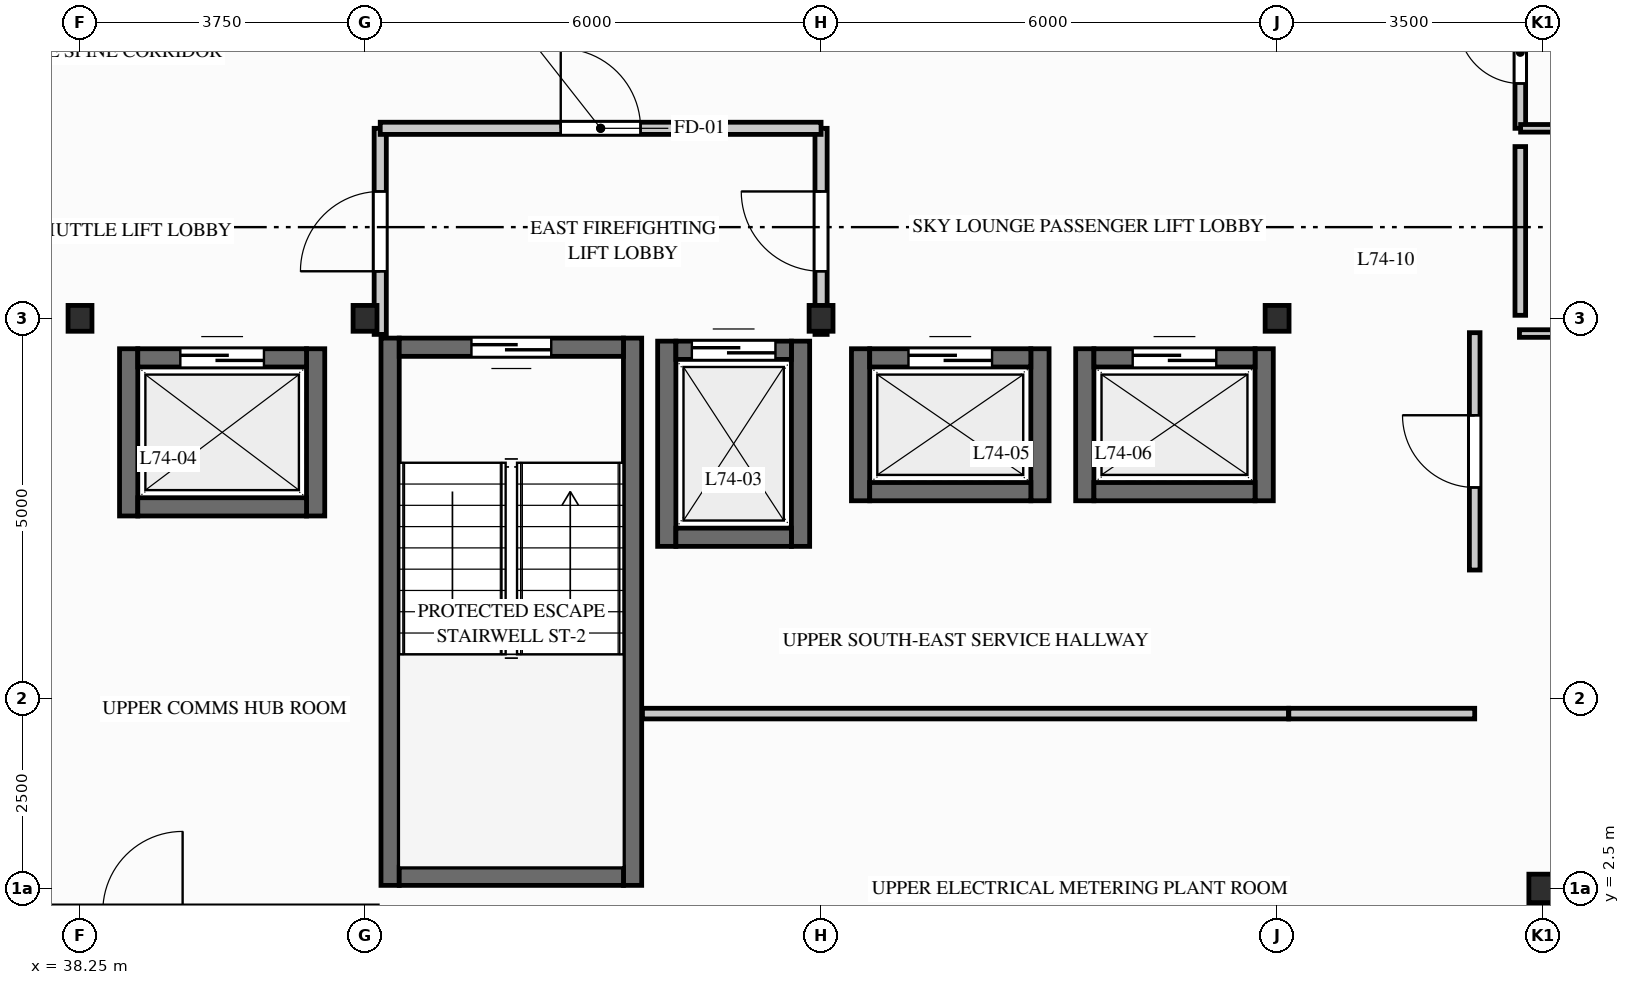
"""IFC4 building model, lengths in metres.
Left out: names, types, materials, properties, quantities, classifications, styles, units other than length and angle.
Written with IfcOpenShell. Run it as: python <this file> out.ifc"""

import sys

from ifc_helpers import new_model, si_unit, direction, frame, frame_2d, origin, origin_2d, place, context, subcontext, project, spatial, rectangle, i_section, extrude, element, fill, save


model = new_model("IFC4")
c1 = context("Model", 3, precision=1e-05, world=origin(), true_north=direction((0.0, 1.0)))
c2 = subcontext(c1, "Body", "Model", "MODEL_VIEW")
j1 = project(units=[si_unit("LENGTHUNIT", "METRE"), si_unit("PLANEANGLEUNIT", "RADIAN")], contexts=[c1])
p1 = place(None, origin())
s1 = spatial("IfcSite", under=j1, at=p1, CompositionType="ELEMENT")
p2 = place(p1, origin())
s2 = spatial("IfcBuilding", under=s1, at=p2, CompositionType="ELEMENT")
p3 = place(p2, frame((0.0, 0.0, 243.65)))
s3 = spatial("IfcBuildingStorey", under=s2, at=p3, CompositionType="ELEMENT", Elevation=243.65)
for number, where, z_axis, x_axis in (
    (1, (38.25, 10.0, 0.0), (0.0, 0.0, 1.0), (1.0, 0.0, 0.0)),
    (2, (42.0, 10.0, 0.0), (0.0, 0.0, 1.0), (1.0, 0.0, 0.0)),
    (3, (48.0, 10.0, 0.0), (0.0, 0.0, 1.0), (1.0, 0.0, 0.0)),
    (4, (54.0, 10.0, 0.0), (0.0, 0.0, 1.0), (1.0, 0.0, 0.0)),
):
    element("IfcColumn", number, at=place(p3, frame(where, z_axis=z_axis, x_axis=x_axis)), inside=s3, PredefinedType="COLUMN", context=c2, shape_type="SweptSolid", body=[
        extrude(i_section(OverallWidth=0.314, OverallDepth=0.34, WebThickness=0.019, FlangeThickness=0.031, FilletRadius=0.015, at=origin_2d()), origin(), (0.0, 0.0, 1.0), 3.6),
    ])
p4 = place(p3, frame((57.5, 2.5, 0.0), z_axis=(0.0, 0.0, 1.0), x_axis=(1.0, 0.0, 0.0)))
e5 = element("IfcColumn", 5, at=p4, inside=s3, PredefinedType="COLUMN", context=c2, shape_type="SweptSolid", body=[
    extrude(i_section(OverallWidth=0.375, OverallDepth=0.375, WebThickness=0.017, FlangeThickness=0.027, FilletRadius=0.015, at=origin_2d()), origin(), (0.0, 0.0, 1.0), 3.6),
])
for number, where, z_axis, x_axis in (
    (6, (57.5, 0.15, 0.0), (0.0, 0.0, 1.0), (0.0, 1.0, 0.0)),
    (7, (57.5, 2.5, 0.0), (0.0, 0.0, 1.0), (1.0, 0.0, 0.0)),
):
    element("IfcWall", number, at=place(p3, frame(where, z_axis=z_axis, x_axis=x_axis)), inside=s3, PredefinedType="STANDARD", context=c2, shape_type="SweptSolid", body=[
        extrude(rectangle(XDim=2.35, YDim=0.3, at=frame_2d((1.175, 0.0))), origin(), (0.0, 0.0, 1.0), 3.34),
    ])
for number, where, z_axis, x_axis in (
    (8, (42.33, 2.54, 0.0), (0.0, 0.0, 1.0), (0.0, 1.0, 0.0)),
    (9, (45.52, 2.54, 0.0), (0.0, 0.0, 1.0), (0.0, 1.0, 0.0)),
):
    element("IfcWall", number, at=place(p3, frame(where, z_axis=z_axis, x_axis=x_axis)), inside=s3, PredefinedType="SHEAR", context=c2, shape_type="SweptSolid", body=[
        extrude(rectangle(XDim=7.2, YDim=0.24, at=frame_2d((3.6, 0.0))), origin(), (0.0, 0.0, 1.0), 3.34),
    ])
p5 = place(p3, frame((42.45, 2.66, 0.0), z_axis=(0.0, 0.0, 1.0), x_axis=(1.0, 0.0, 0.0)))
e10 = element("IfcWall", 10, at=p5, inside=s3, PredefinedType="SHEAR", context=c2, shape_type="SweptSolid", body=[
    extrude(rectangle(XDim=2.95, YDim=0.24, at=frame_2d((1.475, 0.0))), origin(), (0.0, 0.0, 1.0), 3.34),
])
p6 = place(p3, frame((45.4, 9.62, 0.0), z_axis=(0.0, 0.0, 1.0), x_axis=(-1.0, 0.0, 0.0)))
e11 = element("IfcWall", 11, at=p6, inside=s3, PredefinedType="SHEAR", context=c2, shape_type="SweptSolid", body=[
    extrude(rectangle(XDim=2.95, YDim=0.24, at=frame_2d((1.475, 0.0))), origin(), (0.0, 0.0, 1.0), 3.34),
])
p7 = place(p6, frame((0.95, 0.0, 0.0)))
e12 = element("IfcOpeningElement", 12, at=p7, cuts=e11, PredefinedType="OPENING", context=c2, shape_type="SweptSolid", body=[
    extrude(rectangle(XDim=1.05, YDim=2.06, at=frame_2d((0.525, 1.03))), frame((0.0, 0.13, 0.0), z_axis=(0.0, -1.0, 0.0), x_axis=(1.0, 0.0, 0.0)), (0.0, 0.0, 1.0), 0.26),
])
for number, where, z_axis, x_axis in (
    (13, (45.97, 7.0, 0.0), (0.0, 0.0, 1.0), (0.0, 1.0, 0.0)),
    (14, (47.73, 7.0, 0.0), (0.0, 0.0, 1.0), (0.0, 1.0, 0.0)),
):
    element("IfcWall", number, at=place(p3, frame(where, z_axis=z_axis, x_axis=x_axis)), inside=s3, PredefinedType="SHEAR", context=c2, shape_type="SweptSolid", body=[
        extrude(rectangle(XDim=2.7, YDim=0.24, at=frame_2d((1.35, 0.0))), origin(), (0.0, 0.0, 1.0), 3.34),
    ])
p8 = place(p3, frame((46.09, 7.12, 0.0), z_axis=(0.0, 0.0, 1.0), x_axis=(1.0, 0.0, 0.0)))
e15 = element("IfcWall", 15, at=p8, inside=s3, PredefinedType="SHEAR", context=c2, shape_type="SweptSolid", body=[
    extrude(rectangle(XDim=1.52, YDim=0.24, at=frame_2d((0.76, 0.0))), origin(), (0.0, 0.0, 1.0), 3.34),
])
p9 = place(p3, frame((46.09, 9.58, 0.0), z_axis=(0.0, 0.0, 1.0), x_axis=(1.0, 0.0, 0.0)))
e16 = element("IfcWall", 16, at=p9, inside=s3, PredefinedType="SHEAR", context=c2, shape_type="SweptSolid", body=[
    extrude(rectangle(XDim=1.52, YDim=0.24, at=frame_2d((0.76, 0.0))), origin(), (0.0, 0.0, 1.0), 3.34),
])
p10 = place(p9, frame((0.21, 0.0, 0.0)))
e17 = element("IfcOpeningElement", 17, at=p10, cuts=e16, PredefinedType="OPENING", context=c2, shape_type="SweptSolid", body=[
    extrude(rectangle(XDim=1.1, YDim=2.06, at=frame_2d((0.55, 1.03))), frame((0.0, 0.13, 0.0), z_axis=(0.0, -1.0, 0.0), x_axis=(1.0, 0.0, 0.0)), (0.0, 0.0, 1.0), 0.26),
])
for number, where, z_axis, x_axis in (
    (18, (38.89, 7.4, 0.0), (0.0, 0.0, 1.0), (0.0, 1.0, 0.0)),
    (19, (41.35, 7.4, 0.0), (0.0, 0.0, 1.0), (0.0, 1.0, 0.0)),
):
    element("IfcWall", number, at=place(p3, frame(where, z_axis=z_axis, x_axis=x_axis)), inside=s3, PredefinedType="SHEAR", context=c2, shape_type="SweptSolid", body=[
        extrude(rectangle(XDim=2.2, YDim=0.24, at=frame_2d((1.1, 0.0))), origin(), (0.0, 0.0, 1.0), 3.34),
    ])
p11 = place(p3, frame((39.01, 7.52, 0.0), z_axis=(0.0, 0.0, 1.0), x_axis=(1.0, 0.0, 0.0)))
e20 = element("IfcWall", 20, at=p11, inside=s3, PredefinedType="SHEAR", context=c2, shape_type="SweptSolid", body=[
    extrude(rectangle(XDim=2.22, YDim=0.24, at=frame_2d((1.11, 0.0))), origin(), (0.0, 0.0, 1.0), 3.34),
])
p12 = place(p3, frame((39.01, 9.48, 0.0), z_axis=(0.0, 0.0, 1.0), x_axis=(1.0, 0.0, 0.0)))
e21 = element("IfcWall", 21, at=p12, inside=s3, PredefinedType="SHEAR", context=c2, shape_type="SweptSolid", body=[
    extrude(rectangle(XDim=2.22, YDim=0.24, at=frame_2d((1.11, 0.0))), origin(), (0.0, 0.0, 1.0), 3.34),
])
p13 = place(p12, frame((0.56, 0.0, 0.0)))
e22 = element("IfcOpeningElement", 22, at=p13, cuts=e21, PredefinedType="OPENING", context=c2, shape_type="SweptSolid", body=[
    extrude(rectangle(XDim=1.1, YDim=2.06, at=frame_2d((0.55, 1.03))), frame((0.0, 0.13, 0.0), z_axis=(0.0, -1.0, 0.0), x_axis=(1.0, 0.0, 0.0)), (0.0, 0.0, 1.0), 0.26),
])
for number, where, z_axis, x_axis in (
    (23, (48.52, 7.6, 0.0), (0.0, 0.0, 1.0), (0.0, 1.0, 0.0)),
    (24, (50.88, 7.6, 0.0), (0.0, 0.0, 1.0), (0.0, 1.0, 0.0)),
):
    element("IfcWall", number, at=place(p3, frame(where, z_axis=z_axis, x_axis=x_axis)), inside=s3, PredefinedType="SHEAR", context=c2, shape_type="SweptSolid", body=[
        extrude(rectangle(XDim=2.0, YDim=0.24, at=frame_2d((1.0, 0.0))), origin(), (0.0, 0.0, 1.0), 3.34),
    ])
p14 = place(p3, frame((48.64, 7.72, 0.0), z_axis=(0.0, 0.0, 1.0), x_axis=(1.0, 0.0, 0.0)))
e25 = element("IfcWall", 25, at=p14, inside=s3, PredefinedType="SHEAR", context=c2, shape_type="SweptSolid", body=[
    extrude(rectangle(XDim=2.12, YDim=0.24, at=frame_2d((1.06, 0.0))), origin(), (0.0, 0.0, 1.0), 3.34),
])
p15 = place(p3, frame((48.64, 9.48, 0.0), z_axis=(0.0, 0.0, 1.0), x_axis=(1.0, 0.0, 0.0)))
e26 = element("IfcWall", 26, at=p15, inside=s3, PredefinedType="SHEAR", context=c2, shape_type="SweptSolid", body=[
    extrude(rectangle(XDim=2.12, YDim=0.24, at=frame_2d((1.06, 0.0))), origin(), (0.0, 0.0, 1.0), 3.34),
])
p16 = place(p15, frame((0.51, 0.0, 0.0)))
e27 = element("IfcOpeningElement", 27, at=p16, cuts=e26, PredefinedType="OPENING", context=c2, shape_type="SweptSolid", body=[
    extrude(rectangle(XDim=1.1, YDim=2.06, at=frame_2d((0.55, 1.03))), frame((0.0, 0.13, 0.0), z_axis=(0.0, -1.0, 0.0), x_axis=(1.0, 0.0, 0.0)), (0.0, 0.0, 1.0), 0.26),
])
for number, where, z_axis, x_axis in (
    (28, (51.47, 7.6, 0.0), (0.0, 0.0, 1.0), (0.0, 1.0, 0.0)),
    (29, (53.83, 7.6, 0.0), (0.0, 0.0, 1.0), (0.0, 1.0, 0.0)),
):
    element("IfcWall", number, at=place(p3, frame(where, z_axis=z_axis, x_axis=x_axis)), inside=s3, PredefinedType="SHEAR", context=c2, shape_type="SweptSolid", body=[
        extrude(rectangle(XDim=2.0, YDim=0.24, at=frame_2d((1.0, 0.0))), origin(), (0.0, 0.0, 1.0), 3.34),
    ])
p17 = place(p3, frame((51.59, 7.72, 0.0), z_axis=(0.0, 0.0, 1.0), x_axis=(1.0, 0.0, 0.0)))
e30 = element("IfcWall", 30, at=p17, inside=s3, PredefinedType="SHEAR", context=c2, shape_type="SweptSolid", body=[
    extrude(rectangle(XDim=2.12, YDim=0.24, at=frame_2d((1.06, 0.0))), origin(), (0.0, 0.0, 1.0), 3.34),
])
p18 = place(p3, frame((51.59, 9.48, 0.0), z_axis=(0.0, 0.0, 1.0), x_axis=(1.0, 0.0, 0.0)))
e31 = element("IfcWall", 31, at=p18, inside=s3, PredefinedType="SHEAR", context=c2, shape_type="SweptSolid", body=[
    extrude(rectangle(XDim=2.12, YDim=0.24, at=frame_2d((1.06, 0.0))), origin(), (0.0, 0.0, 1.0), 3.34),
])
p19 = place(p18, frame((0.51, 0.0, 0.0)))
e32 = element("IfcOpeningElement", 32, at=p19, cuts=e31, PredefinedType="OPENING", context=c2, shape_type="SweptSolid", body=[
    extrude(rectangle(XDim=1.1, YDim=2.06, at=frame_2d((0.55, 1.03))), frame((0.0, 0.13, 0.0), z_axis=(0.0, -1.0, 0.0), x_axis=(1.0, 0.0, 0.0)), (0.0, 0.0, 1.0), 0.26),
])
p20 = place(p3, frame((45.65, 4.8, 0.0), z_axis=(0.0, 0.0, 1.0), x_axis=(1.0, 0.0, 0.0)))
e33 = element("IfcWall", 33, at=p20, inside=s3, PredefinedType="PARTITIONING", context=c2, shape_type="SweptSolid", body=[
    extrude(rectangle(XDim=8.5, YDim=0.14, at=frame_2d((4.25, 0.0))), origin(), (0.0, 0.0, 1.0), 2.703),
])
p21 = place(p3, frame((54.154, 4.8, 0.0), z_axis=(0.0, 0.0, 1.0), x_axis=(1.0, 0.0, 0.0)))
e34 = element("IfcWall", 34, at=p21, inside=s3, PredefinedType="PARTITIONING", context=c2, shape_type="SweptSolid", body=[
    extrude(rectangle(XDim=2.446, YDim=0.14, at=frame_2d((1.223, 0.0))), origin(), (0.0, 0.0, 1.0), 3.34),
])
p22 = place(p3, frame((56.6, 6.689, 0.0), z_axis=(0.0, 0.0, 1.0), x_axis=(0.0, 1.0, 0.0)))
e35 = element("IfcWall", 35, at=p22, inside=s3, PredefinedType="PARTITIONING", context=c2, shape_type="SweptSolid", body=[
    extrude(rectangle(XDim=3.123, YDim=0.14, at=frame_2d((1.561, 0.0))), origin(), (0.0, 0.0, 1.0), 3.34),
])
p23 = place(p22, frame((1.086, 0.0, 0.0)))
e36 = element("IfcOpeningElement", 36, at=p23, cuts=e35, PredefinedType="OPENING", context=c2, shape_type="SweptSolid", body=[
    extrude(rectangle(XDim=0.95, YDim=2.05, at=frame_2d((0.475, 1.025))), frame((0.0, 0.08, 0.0), z_axis=(0.0, -1.0, 0.0), x_axis=(1.0, 0.0, 0.0)), (0.0, 0.0, 1.0), 0.16),
])
p24 = place(p3, frame((42.2, 9.789, 0.0), z_axis=(0.0, 0.0, 1.0), x_axis=(0.0, 1.0, 0.0)))
e37 = element("IfcWall", 37, at=p24, inside=s3, PredefinedType="PARTITIONING", context=c2, shape_type="SweptSolid", body=[
    extrude(rectangle(XDim=2.711, YDim=0.16, at=frame_2d((1.355, 0.0))), origin(), (0.0, 0.0, 1.0), 2.279),
])
p25 = place(p24, frame((0.831, 0.0, 0.0)))
e38 = element("IfcOpeningElement", 38, at=p25, cuts=e37, PredefinedType="OPENING", context=c2, shape_type="SweptSolid", body=[
    extrude(rectangle(XDim=1.05, YDim=2.06, at=frame_2d((0.525, 1.03))), frame((0.0, 0.09, 0.0), z_axis=(0.0, -1.0, 0.0), x_axis=(1.0, 0.0, 0.0)), (0.0, 0.0, 1.0), 0.18),
])
p26 = place(p3, frame((48.0, 9.789, 0.0), z_axis=(0.0, 0.0, 1.0), x_axis=(0.0, 1.0, 0.0)))
e39 = element("IfcWall", 39, at=p26, inside=s3, PredefinedType="PARTITIONING", context=c2, shape_type="SweptSolid", body=[
    extrude(rectangle(XDim=2.711, YDim=0.16, at=frame_2d((1.355, 0.0))), origin(), (0.0, 0.0, 1.0), 2.703),
])
p27 = place(p26, frame((0.831, 0.0, 0.0)))
e40 = element("IfcOpeningElement", 40, at=p27, cuts=e39, PredefinedType="OPENING", context=c2, shape_type="SweptSolid", body=[
    extrude(rectangle(XDim=1.05, YDim=2.06, at=frame_2d((0.525, 1.03))), frame((0.0, 0.09, 0.0), z_axis=(0.0, -1.0, 0.0), x_axis=(1.0, 0.0, 0.0)), (0.0, 0.0, 1.0), 0.18),
])
p28 = place(p3, frame((42.2, 12.5, 0.0), z_axis=(0.0, 0.0, 1.0), x_axis=(1.0, 0.0, 0.0)))
e41 = element("IfcWall", 41, at=p28, inside=s3, PredefinedType="PARTITIONING", context=c2, shape_type="SweptSolid", body=[
    extrude(rectangle(XDim=5.8, YDim=0.16, at=frame_2d((2.9, 0.0))), origin(), (0.0, 0.0, 1.0), 2.703),
])
p29 = place(p28, frame((2.375, 0.0, 0.0)))
e42 = element("IfcOpeningElement", 42, at=p29, cuts=e41, PredefinedType="OPENING", context=c2, shape_type="SweptSolid", body=[
    extrude(rectangle(XDim=1.05, YDim=2.06, at=frame_2d((0.525, 1.03))), frame((0.0, 0.09, 0.0), z_axis=(0.0, -1.0, 0.0), x_axis=(1.0, 0.0, 0.0)), (0.0, 0.0, 1.0), 0.18),
])
p30 = place(p3, frame((57.189, 9.8, 0.0), z_axis=(0.0, 0.0, 1.0), x_axis=(1.0, 0.0, 0.0)))
e43 = element("IfcWall", 43, at=p30, inside=s3, PredefinedType="PARTITIONING", context=c2, shape_type="SweptSolid", body=[
    extrude(rectangle(XDim=2.611, YDim=0.1, at=frame_2d((1.306, 0.0))), origin(), (0.0, 0.0, 1.0), 2.703),
])
p31 = place(p30, frame((0.896, 0.0, 0.0)))
e44 = element("IfcOpeningElement", 44, at=p31, cuts=e43, PredefinedType="OPENING", context=c2, shape_type="SweptSolid", body=[
    extrude(rectangle(XDim=0.82, YDim=2.02, at=frame_2d((0.41, 1.01))), frame((0.0, 0.06, 0.0), z_axis=(0.0, -1.0, 0.0), x_axis=(1.0, 0.0, 0.0)), (0.0, 0.0, 1.0), 0.12),
])
p32 = place(p3, frame((57.2, 12.5, 0.0), z_axis=(0.0, 0.0, 1.0), x_axis=(0.0, 1.0, 0.0)))
e45 = element("IfcWall", 45, at=p32, inside=s3, PredefinedType="PARTITIONING", context=c2, shape_type="SweptSolid", body=[
    extrude(rectangle(XDim=2.0, YDim=0.14, at=frame_2d((1.0, 0.0))), origin(), (0.0, 0.0, 1.0), 3.34),
])
p33 = place(p32, frame((0.59, 0.0, 0.0)))
e46 = element("IfcOpeningElement", 46, at=p33, cuts=e45, PredefinedType="OPENING", context=c2, shape_type="SweptSolid", body=[
    extrude(rectangle(XDim=0.82, YDim=2.02, at=frame_2d((0.41, 1.01))), frame((0.0, 0.08, 0.0), z_axis=(0.0, -1.0, 0.0), x_axis=(1.0, 0.0, 0.0)), (0.0, 0.0, 1.0), 0.16),
])
p34 = place(p3, frame((57.204, 12.5, 0.0), z_axis=(0.0, 0.0, 1.0), x_axis=(1.0, 0.0, 0.0)))
e47 = element("IfcWall", 47, at=p34, inside=s3, PredefinedType="PARTITIONING", context=c2, shape_type="SweptSolid", body=[
    extrude(rectangle(XDim=2.596, YDim=0.1, at=frame_2d((1.298, 0.0))), origin(), (0.0, 0.0, 1.0), 3.34),
])
p35 = place(p3, frame((57.2, 10.04, 0.0), z_axis=(0.0, 0.0, 1.0), x_axis=(0.0, 1.0, 0.0)))
e48 = element("IfcWall", 48, at=p35, inside=s3, PredefinedType="PARTITIONING", context=c2, shape_type="SweptSolid", body=[
    extrude(rectangle(XDim=2.22, YDim=0.14, at=frame_2d((1.11, 0.0))), origin(), (0.0, 0.0, 1.0), 2.703),
])
p36 = place(p7, origin())
e49 = element("IfcDoor", 49, at=p36, inside=s3, OperationType="SINGLE_SWING_LEFT", PredefinedType="DOOR", context=c2, shape_type="SweptSolid", body=[
    extrude(rectangle(XDim=1.05, YDim=2.06, at=frame_2d((0.525, 1.03))), frame((0.0, 0.025, 0.0), z_axis=(0.0, -1.0, 0.0), x_axis=(1.0, 0.0, 0.0)), (0.0, 0.0, 1.0), 0.05),
])
fill(e12, e49)
p37 = place(p10, origin())
e50 = element("IfcDoor", 50, at=p37, inside=s3, OperationType="SLIDING_TO_LEFT", PredefinedType="DOOR", context=c2, shape_type="SweptSolid", body=[
    extrude(rectangle(XDim=1.1, YDim=2.06, at=frame_2d((0.55, 1.03))), frame((0.0, 0.025, 0.0), z_axis=(0.0, -1.0, 0.0), x_axis=(1.0, 0.0, 0.0)), (0.0, 0.0, 1.0), 0.05),
])
fill(e17, e50)
p38 = place(p13, origin())
e51 = element("IfcDoor", 51, at=p38, inside=s3, OperationType="SLIDING_TO_RIGHT", PredefinedType="DOOR", context=c2, shape_type="SweptSolid", body=[
    extrude(rectangle(XDim=1.1, YDim=2.06, at=frame_2d((0.55, 1.03))), frame((0.0, 0.025, 0.0), z_axis=(0.0, -1.0, 0.0), x_axis=(1.0, 0.0, 0.0)), (0.0, 0.0, 1.0), 0.05),
])
fill(e22, e51)
p39 = place(p16, origin())
e52 = element("IfcDoor", 52, at=p39, inside=s3, OperationType="SLIDING_TO_LEFT", PredefinedType="DOOR", context=c2, shape_type="SweptSolid", body=[
    extrude(rectangle(XDim=1.1, YDim=2.06, at=frame_2d((0.55, 1.03))), frame((0.0, 0.025, 0.0), z_axis=(0.0, -1.0, 0.0), x_axis=(1.0, 0.0, 0.0)), (0.0, 0.0, 1.0), 0.05),
])
fill(e27, e52)
p40 = place(p19, origin())
e53 = element("IfcDoor", 53, at=p40, inside=s3, OperationType="SLIDING_TO_RIGHT", PredefinedType="DOOR", context=c2, shape_type="SweptSolid", body=[
    extrude(rectangle(XDim=1.1, YDim=2.06, at=frame_2d((0.55, 1.03))), frame((0.0, 0.025, 0.0), z_axis=(0.0, -1.0, 0.0), x_axis=(1.0, 0.0, 0.0)), (0.0, 0.0, 1.0), 0.05),
])
fill(e32, e53)
p41 = place(p23, origin())
e54 = element("IfcDoor", 54, at=p41, inside=s3, OperationType="SINGLE_SWING_RIGHT", PredefinedType="DOOR", context=c2, shape_type="SweptSolid", body=[
    extrude(rectangle(XDim=0.95, YDim=2.05, at=frame_2d((0.475, 1.025))), frame((0.0, 0.025, 0.0), z_axis=(0.0, -1.0, 0.0), x_axis=(1.0, 0.0, 0.0)), (0.0, 0.0, 1.0), 0.05),
])
fill(e36, e54)
p42 = place(p25, origin())
e55 = element("IfcDoor", 55, at=p42, inside=s3, OperationType="SINGLE_SWING_LEFT", PredefinedType="DOOR", context=c2, shape_type="SweptSolid", body=[
    extrude(rectangle(XDim=1.05, YDim=2.06, at=frame_2d((0.525, 1.03))), frame((0.0, 0.025, 0.0), z_axis=(0.0, -1.0, 0.0), x_axis=(1.0, 0.0, 0.0)), (0.0, 0.0, 1.0), 0.05),
])
fill(e38, e55)
p43 = place(p27, origin())
e56 = element("IfcDoor", 56, at=p43, inside=s3, OperationType="SINGLE_SWING_RIGHT", PredefinedType="DOOR", context=c2, shape_type="SweptSolid", body=[
    extrude(rectangle(XDim=1.05, YDim=2.06, at=frame_2d((0.525, 1.03))), frame((0.0, 0.025, 0.0), z_axis=(0.0, -1.0, 0.0), x_axis=(1.0, 0.0, 0.0)), (0.0, 0.0, 1.0), 0.05),
])
fill(e40, e56)
p44 = place(p29, origin())
e57 = element("IfcDoor", 57, at=p44, inside=s3, OperationType="SINGLE_SWING_LEFT", PredefinedType="DOOR", context=c2, shape_type="SweptSolid", body=[
    extrude(rectangle(XDim=1.05, YDim=2.06, at=frame_2d((0.525, 1.03))), frame((0.0, 0.025, 0.0), z_axis=(0.0, -1.0, 0.0), x_axis=(1.0, 0.0, 0.0)), (0.0, 0.0, 1.0), 0.05),
])
fill(e42, e57)
p45 = place(p33, origin())
e58 = element("IfcDoor", 58, at=p45, inside=s3, OperationType="SINGLE_SWING_RIGHT", PredefinedType="DOOR", context=c2, shape_type="SweptSolid", body=[
    extrude(rectangle(XDim=0.82, YDim=2.02, at=frame_2d((0.41, 1.01))), frame((0.0, 0.025, 0.0), z_axis=(0.0, -1.0, 0.0), x_axis=(1.0, 0.0, 0.0)), (0.0, 0.0, 1.0), 0.05),
])
fill(e46, e58)
save(model, sys.argv[1])
